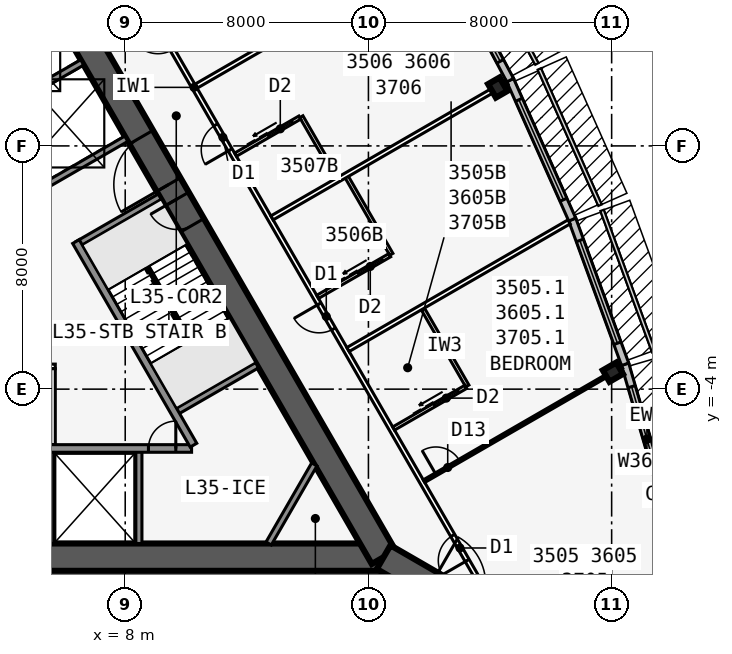
"""IFC4 building model, lengths in metres.
Left out: names, types, materials, properties, quantities, classifications, styles, units other than length and angle.
Written with IfcOpenShell. Run it as: python <this file> out.ifc"""

import sys

from ifc_helpers import new_model, si_unit, direction, frame, frame_2d, origin, origin_2d, place, context, subcontext, project, spatial, rectangle, i_section, extrude, element, fill, save


model = new_model("IFC4")
c1 = context("Model", 3, precision=1e-05, world=origin(), true_north=direction((0.0, 1.0)))
c2 = subcontext(c1, "Body", "Model", "MODEL_VIEW")
j1 = project(units=[si_unit("LENGTHUNIT", "METRE"), si_unit("PLANEANGLEUNIT", "RADIAN")], contexts=[c1])
p1 = place(None, origin())
s1 = spatial("IfcSite", under=j1, at=p1, CompositionType="ELEMENT")
p2 = place(p1, origin())
s2 = spatial("IfcBuilding", under=s1, at=p2, CompositionType="ELEMENT")
p3 = place(p2, frame((0.0, 0.0, 135.1)))
s3 = spatial("IfcBuildingStorey", under=s2, at=p3, CompositionType="ELEMENT", Elevation=135.1)
p4 = place(p3, frame((-16.5, -9.526, 0.0), z_axis=(0.0, 0.0, 1.0), x_axis=(1.0, 0.0, 0.0)))
e1 = element("IfcWall", 1, at=p4, inside=s3, PredefinedType="SHEAR", context=c2, shape_type="SweptSolid", body=[
    extrude(rectangle(XDim=33.0, YDim=0.9, at=frame_2d((16.5, 0.0))), origin(), (0.0, 0.0, 1.0), 3.4),
])
p5 = place(p4, frame((14.05, 0.0, 0.0)))
e2 = element("IfcOpeningElement", 2, at=p5, cuts=e1, PredefinedType="OPENING", context=c2, shape_type="SweptSolid", body=[
    extrude(rectangle(XDim=1.8, YDim=2.13, at=frame_2d((0.9, 1.065))), frame((0.0, 0.46, 0.0), z_axis=(0.0, -1.0, 0.0), x_axis=(1.0, 0.0, 0.0)), (0.0, 0.0, 1.0), 0.92),
])
p6 = place(p3, frame((-0.55, -5.951, 0.0), z_axis=(0.0, 0.0, 1.0), x_axis=(1.0, 0.0, 0.0)))
e3 = element("IfcWall", 3, at=p6, inside=s3, PredefinedType="SOLIDWALL", context=c2, shape_type="SweptSolid", body=[
    extrude(rectangle(XDim=10.733, YDim=0.25, at=frame_2d((5.366, 0.0))), origin(), (0.0, 0.0, 1.0), 3.235),
])
p7 = place(p6, frame((9.314, 0.0, 0.0)))
e4 = element("IfcOpeningElement", 4, at=p7, cuts=e3, PredefinedType="OPENING", context=c2, shape_type="SweptSolid", body=[
    extrude(rectangle(XDim=0.9, YDim=2.13, at=frame_2d((0.45, 1.065))), frame((0.0, 0.135, 0.0), z_axis=(0.0, -1.0, 0.0), x_axis=(1.0, 0.0, 0.0)), (0.0, 0.0, 1.0), 0.27),
])
p8 = place(p6, frame((1.05, 0.0, 0.0)))
e5 = element("IfcOpeningElement", 5, at=p8, cuts=e3, PredefinedType="OPENING", context=c2, shape_type="SweptSolid", body=[
    extrude(rectangle(XDim=1.1, YDim=2.13, at=frame_2d((0.55, 1.065))), frame((0.0, 0.135, 0.0), z_axis=(0.0, -1.0, 0.0), x_axis=(1.0, 0.0, 0.0)), (0.0, 0.0, 1.0), 0.27),
])
p9 = place(p6, frame((4.05, 0.0, 0.0)))
e6 = element("IfcOpeningElement", 6, at=p9, cuts=e3, PredefinedType="OPENING", context=c2, shape_type="SweptSolid", body=[
    extrude(rectangle(XDim=1.1, YDim=2.13, at=frame_2d((0.55, 1.065))), frame((0.0, 0.135, 0.0), z_axis=(0.0, -1.0, 0.0), x_axis=(1.0, 0.0, 0.0)), (0.0, 0.0, 1.0), 0.27),
])
for number, where, z_axis, x_axis in (
    (7, (5.55, -5.951, 0.0), (0.0, 0.0, 1.0), (0.0, -1.0, 0.0)),
    (8, (8.45, -5.951, 0.0), (0.0, 0.0, 1.0), (0.0, -1.0, 0.0)),
):
    element("IfcWall", number, at=place(p3, frame(where, z_axis=z_axis, x_axis=x_axis)), inside=s3, PredefinedType="SOLIDWALL", context=c2, shape_type="SweptSolid", body=[
        extrude(rectangle(XDim=3.125, YDim=0.2, at=frame_2d((1.562, 0.0))), origin(), (0.0, 0.0, 1.0), 3.235),
    ])
p10 = place(p3, frame((16.5, -9.526, 0.0), z_axis=(0.0, 0.0, 1.0), x_axis=(-0.499999749417, 0.866025548458, 0.0)))
e9 = element("IfcWall", 9, at=p10, inside=s3, PredefinedType="SHEAR", context=c2, shape_type="SweptSolid", body=[
    extrude(rectangle(XDim=33.0, YDim=0.9, at=frame_2d((16.5, 0.0))), origin(), (0.0, 0.0, 1.0), 3.4),
])
p11 = place(p10, frame((14.15, 0.0, 0.0)))
e10 = element("IfcOpeningElement", 10, at=p11, cuts=e9, PredefinedType="OPENING", context=c2, shape_type="SweptSolid", body=[
    extrude(rectangle(XDim=1.8, YDim=2.13, at=frame_2d((0.9, 1.065))), frame((0.0, 0.46, 0.0), z_axis=(0.0, -1.0, 0.0), x_axis=(1.0, 0.0, 0.0)), (0.0, 0.0, 1.0), 0.92),
])
p12 = place(p10, frame((12.6, 0.0, 0.0)))
e11 = element("IfcOpeningElement", 11, at=p12, cuts=e9, PredefinedType="OPENING", context=c2, shape_type="SweptSolid", body=[
    extrude(rectangle(XDim=1.0, YDim=2.13, at=frame_2d((0.5, 1.065))), frame((0.0, 0.46, 0.0), z_axis=(0.0, -1.0, 0.0), x_axis=(1.0, 0.0, 0.0)), (0.0, 0.0, 1.0), 0.92),
])
p13 = place(p3, frame((10.245, -5.843, 0.0), z_axis=(0.0, 0.0, 1.0), x_axis=(-0.499993009313, 0.866029439822, 0.0)))
e12 = element("IfcWall", 12, at=p13, inside=s3, PredefinedType="SOLIDWALL", context=c2, shape_type="SweptSolid", body=[
    extrude(rectangle(XDim=7.733, YDim=0.25, at=frame_2d((3.866, 0.0))), origin(), (0.0, 0.0, 1.0), 3.235),
])
for number, where, z_axis, x_axis in (
    (13, (9.629, -4.775, 0.0), (0.0, 0.0, 1.0), (0.866, 0.5, 0.0)),
    (14, (6.429, 0.767, 0.0), (0.0, 0.0, 1.0), (0.866, 0.5, 0.0)),
    (15, (5.329, 2.673, 0.0), (0.0, 0.0, 1.0), (0.866, 0.5, 0.0)),
    (16, (3.879, 5.184, 0.0), (0.0, 0.0, 1.0), (0.866, 0.5, 0.0)),
):
    element("IfcWall", number, at=place(p3, frame(where, z_axis=z_axis, x_axis=x_axis)), inside=s3, PredefinedType="SOLIDWALL", context=c2, shape_type="SweptSolid", body=[
        extrude(rectangle(XDim=3.125, YDim=0.2, at=frame_2d((1.562, 0.0))), origin(), (0.0, 0.0, 1.0), 3.235),
    ])
p14 = place(p3, frame((16.5, -9.526, 0.0), z_axis=(0.0, 0.0, 1.0), x_axis=(0.866031398331, -0.499989616998, 0.0)))
e17 = element("IfcWall", 17, at=p14, inside=s3, PredefinedType="SHEAR", context=c2, shape_type="SweptSolid", body=[
    extrude(rectangle(XDim=4.746, YDim=0.9, at=frame_2d((2.373, 0.0))), origin(), (0.0, 0.0, 1.0), 3.4),
])
p15 = place(p14, frame((1.8, 0.0, 0.0)))
e18 = element("IfcOpeningElement", 18, at=p15, cuts=e17, PredefinedType="OPENING", context=c2, shape_type="SweptSolid", body=[
    extrude(rectangle(XDim=1.8, YDim=2.13, at=frame_2d((0.9, 1.065))), frame((0.0, 0.46, 0.0), z_axis=(0.0, -1.0, 0.0), x_axis=(1.0, 0.0, 0.0)), (0.0, 0.0, 1.0), 0.92),
])
for number, where, z_axis, x_axis in (
    (19, (24.041, -3.44, 0.0), (0.0, 0.0, 1.0), (-0.5, 0.866, 0.0)),
    (20, (20.254, 5.92, 0.0), (0.0, 0.0, 1.0), (0.866, 0.5, 0.0)),
):
    element("IfcColumn", number, at=place(p3, frame(where, z_axis=z_axis, x_axis=x_axis)), inside=s3, PredefinedType="COLUMN", context=c2, shape_type="SweptSolid", body=[
        extrude(i_section(OverallWidth=0.437, OverallDepth=0.513, WebThickness=0.061, FlangeThickness=0.097, at=origin_2d()), origin(), (0.0, 0.0, 1.0), 3.4),
    ])
p16 = place(p3, frame((25.88, -8.118, 0.0), z_axis=(0.0, 0.0, 1.0), x_axis=(-0.279528287117, 0.960137457191, 0.0)))
e21 = element("IfcWall", 21, at=p16, inside=s3, PredefinedType="STANDARD", context=c2, shape_type="SweptSolid", body=[
    extrude(rectangle(XDim=5.148, YDim=0.25, at=frame_2d((2.574, 0.0))), origin(), (0.0, 0.0, 1.0), 3.235),
])
p17 = place(p16, frame((0.774, 0.0, 0.45)))
e22 = element("IfcOpeningElement", 22, at=p17, cuts=e21, PredefinedType="OPENING", context=c2, shape_type="SweptSolid", body=[
    extrude(rectangle(XDim=3.6, YDim=2.4, at=frame_2d((1.8, 1.2))), frame((0.0, 0.135, 0.0), z_axis=(0.0, -1.0, 0.0), x_axis=(1.0, 0.0, 0.0)), (0.0, 0.0, 1.0), 0.27),
])
p18 = place(p3, frame((24.444, -3.183, 0.0), z_axis=(0.0, 0.0, 1.0), x_axis=(-0.343225593282, 0.939252996863, 0.0)))
e23 = element("IfcWall", 23, at=p18, inside=s3, PredefinedType="STANDARD", context=c2, shape_type="SweptSolid", body=[
    extrude(rectangle(XDim=5.076, YDim=0.25, at=frame_2d((2.538, 0.0))), origin(), (0.0, 0.0, 1.0), 3.235),
])
p19 = place(p18, frame((0.738, 0.0, 0.45)))
e24 = element("IfcOpeningElement", 24, at=p19, cuts=e23, PredefinedType="OPENING", context=c2, shape_type="SweptSolid", body=[
    extrude(rectangle(XDim=3.6, YDim=2.4, at=frame_2d((1.8, 1.2))), frame((0.0, 0.135, 0.0), z_axis=(0.0, -1.0, 0.0), x_axis=(1.0, 0.0, 0.0)), (0.0, 0.0, 1.0), 0.27),
])
p20 = place(p3, frame((22.705, 1.576, 0.0), z_axis=(0.0, 0.0, 1.0), x_axis=(-0.406832200364, 0.913502906808, 0.0)))
e25 = element("IfcWall", 25, at=p20, inside=s3, PredefinedType="STANDARD", context=c2, shape_type="SweptSolid", body=[
    extrude(rectangle(XDim=5.028, YDim=0.25, at=frame_2d((2.514, 0.0))), origin(), (0.0, 0.0, 1.0), 3.235),
])
p21 = place(p20, frame((0.714, 0.0, 0.45)))
e26 = element("IfcOpeningElement", 26, at=p21, cuts=e25, PredefinedType="OPENING", context=c2, shape_type="SweptSolid", body=[
    extrude(rectangle(XDim=3.6, YDim=2.4, at=frame_2d((1.8, 1.2))), frame((0.0, 0.135, 0.0), z_axis=(0.0, -1.0, 0.0), x_axis=(1.0, 0.0, 0.0)), (0.0, 0.0, 1.0), 0.27),
])
p22 = place(p3, frame((20.663, 6.161, 0.0), z_axis=(0.0, 0.0, 1.0), x_axis=(-0.469404966864, 0.882982999317, 0.0)))
e27 = element("IfcWall", 27, at=p22, inside=s3, PredefinedType="STANDARD", context=c2, shape_type="SweptSolid", body=[
    extrude(rectangle(XDim=5.003, YDim=0.25, at=frame_2d((2.501, 0.0))), origin(), (0.0, 0.0, 1.0), 3.235),
])
p23 = place(p22, frame((0.701, 0.0, 0.45)))
e28 = element("IfcOpeningElement", 28, at=p23, cuts=e27, PredefinedType="OPENING", context=c2, shape_type="SweptSolid", body=[
    extrude(rectangle(XDim=3.6, YDim=2.4, at=frame_2d((1.8, 1.2))), frame((0.0, 0.135, 0.0), z_axis=(0.0, -1.0, 0.0), x_axis=(1.0, 0.0, 0.0)), (0.0, 0.0, 1.0), 0.27),
])
p24 = place(p3, frame((20.027, -10.985, 0.0), z_axis=(0.0, 0.0, 1.0), x_axis=(-0.500001677587, 0.866024435227, 0.0)))
e29 = element("IfcWall", 29, at=p24, inside=s3, PredefinedType="PARTITIONING", context=c2, shape_type="SweptSolid", body=[
    extrude(rectangle(XDim=39.054, YDim=0.15, at=frame_2d((19.527, 0.0))), origin(), (0.0, 0.0, 1.0), 3.235),
])
p25 = place(p24, frame((1.558, 0.0, 0.0)))
e30 = element("IfcOpeningElement", 30, at=p25, cuts=e29, PredefinedType="OPENING", context=c2, shape_type="SweptSolid", body=[
    extrude(rectangle(XDim=0.95, YDim=2.13, at=frame_2d((0.475, 1.065))), frame((0.0, 0.085, 0.0), z_axis=(0.0, -1.0, 0.0), x_axis=(1.0, 0.0, 0.0)), (0.0, 0.0, 1.0), 0.17),
])
p26 = place(p24, frame((10.352, 0.0, 0.0)))
e31 = element("IfcOpeningElement", 31, at=p26, cuts=e29, PredefinedType="OPENING", context=c2, shape_type="SweptSolid", body=[
    extrude(rectangle(XDim=0.95, YDim=2.13, at=frame_2d((0.475, 1.065))), frame((0.0, 0.085, 0.0), z_axis=(0.0, -1.0, 0.0), x_axis=(1.0, 0.0, 0.0)), (0.0, 0.0, 1.0), 0.17),
])
p27 = place(p24, frame((17.152, 0.0, 0.0)))
e32 = element("IfcOpeningElement", 32, at=p27, cuts=e29, PredefinedType="OPENING", context=c2, shape_type="SweptSolid", body=[
    extrude(rectangle(XDim=0.95, YDim=2.13, at=frame_2d((0.475, 1.065))), frame((0.0, 0.085, 0.0), z_axis=(0.0, -1.0, 0.0), x_axis=(1.0, 0.0, 0.0)), (0.0, 0.0, 1.0), 0.17),
])
p28 = place(p24, frame((20.952, 0.0, 0.0)))
e33 = element("IfcOpeningElement", 33, at=p28, cuts=e29, PredefinedType="OPENING", context=c2, shape_type="SweptSolid", body=[
    extrude(rectangle(XDim=0.95, YDim=2.13, at=frame_2d((0.475, 1.065))), frame((0.0, 0.085, 0.0), z_axis=(0.0, -1.0, 0.0), x_axis=(1.0, 0.0, 0.0)), (0.0, 0.0, 1.0), 0.17),
])
p29 = place(p24, frame((27.152, 0.0, 0.0)))
e34 = element("IfcOpeningElement", 34, at=p29, cuts=e29, PredefinedType="OPENING", context=c2, shape_type="SweptSolid", body=[
    extrude(rectangle(XDim=0.95, YDim=2.13, at=frame_2d((0.475, 1.065))), frame((0.0, 0.085, 0.0), z_axis=(0.0, -1.0, 0.0), x_axis=(1.0, 0.0, 0.0)), (0.0, 0.0, 1.0), 0.17),
])
p30 = place(p24, frame((36.546, 0.0, 0.0)))
e35 = element("IfcOpeningElement", 35, at=p30, cuts=e29, PredefinedType="OPENING", context=c2, shape_type="SweptSolid", body=[
    extrude(rectangle(XDim=0.95, YDim=2.13, at=frame_2d((0.475, 1.065))), frame((0.0, 0.085, 0.0), z_axis=(0.0, -1.0, 0.0), x_axis=(1.0, 0.0, 0.0)), (0.0, 0.0, 1.0), 0.17),
])
p31 = place(p3, frame((17.829, -7.027, 0.0), z_axis=(0.0, 0.0, 1.0), x_axis=(0.866029804378, 0.499992377871, 0.0)))
e36 = element("IfcWall", 36, at=p31, inside=s3, PredefinedType="PARTITIONING", context=c2, shape_type="SweptSolid", body=[
    extrude(rectangle(XDim=7.516, YDim=0.1, at=frame_2d((3.758, 0.0))), origin(), (0.0, 0.0, 1.0), 2.389),
])
p32 = place(p31, frame((0.45, 0.0, 0.0)))
e37 = element("IfcOpeningElement", 37, at=p32, cuts=e36, PredefinedType="OPENING", context=c2, shape_type="SweptSolid", body=[
    extrude(rectangle(XDim=0.9, YDim=2.13, at=frame_2d((0.45, 1.065))), frame((0.0, 0.06, 0.0), z_axis=(0.0, -1.0, 0.0), x_axis=(1.0, 0.0, 0.0)), (0.0, 0.0, 1.0), 0.12),
])
p33 = place(p3, frame((15.329, -2.697, 0.0), z_axis=(0.0, 0.0, 1.0), x_axis=(0.866024316602, 0.50000188305, 0.0)))
e38 = element("IfcWall", 38, at=p33, inside=s3, PredefinedType="PARTITIONING", context=c2, shape_type="SweptSolid", body=[
    extrude(rectangle(XDim=8.395, YDim=0.15, at=frame_2d((4.198, 0.0))), origin(), (0.0, 0.0, 1.0), 2.389),
])
p34 = place(p3, frame((12.829, 1.633, 0.0), z_axis=(0.0, 0.0, 1.0), x_axis=(0.866027015393, 0.499997208602, 0.0)))
e39 = element("IfcWall", 39, at=p34, inside=s3, PredefinedType="PARTITIONING", context=c2, shape_type="SweptSolid", body=[
    extrude(rectangle(XDim=8.922, YDim=0.15, at=frame_2d((4.461, 0.0))), origin(), (0.0, 0.0, 1.0), 2.389),
])
p35 = place(p3, frame((10.329, 5.963, 0.0), z_axis=(0.0, 0.0, 1.0), x_axis=(0.866025170687, 0.500000403736, 0.0)))
e40 = element("IfcWall", 40, at=p35, inside=s3, PredefinedType="PARTITIONING", context=c2, shape_type="SweptSolid", body=[
    extrude(rectangle(XDim=9.099, YDim=0.15, at=frame_2d((4.549, 0.0))), origin(), (0.0, 0.0, 1.0), 2.389),
])
p36 = place(p3, frame((19.253, -3.895, 0.0), z_axis=(0.0, 0.0, 1.0), x_axis=(-0.499990139034, 0.866031096941, 0.0)))
e41 = element("IfcWall", 41, at=p36, inside=s3, PredefinedType="PLUMBINGWALL", context=c2, shape_type="SweptSolid", body=[
    extrude(rectangle(XDim=3.0, YDim=0.12, at=frame_2d((1.5, 0.0))), origin(), (0.0, 0.0, 1.0), 3.235),
])
p37 = place(p3, frame((16.829, -5.295, 0.0), z_axis=(0.0, 0.0, 1.0), x_axis=(0.866035715982, 0.499982138324, 0.0)))
e42 = element("IfcWall", 42, at=p37, inside=s3, PredefinedType="PLUMBINGWALL", context=c2, shape_type="SweptSolid", body=[
    extrude(rectangle(XDim=2.74, YDim=0.12, at=frame_2d((1.37, 0.0))), origin(), (0.0, 0.0, 1.0), 3.235),
])
p38 = place(p37, frame((1.55, 0.0, 0.0)))
e43 = element("IfcOpeningElement", 43, at=p38, cuts=e42, PredefinedType="OPENING", context=c2, shape_type="SweptSolid", body=[
    extrude(rectangle(XDim=0.9, YDim=2.13, at=frame_2d((0.45, 1.065))), frame((0.0, 0.07, 0.0), z_axis=(0.0, -1.0, 0.0), x_axis=(1.0, 0.0, 0.0)), (0.0, 0.0, 1.0), 0.14),
])
p39 = place(p3, frame((16.753, 0.435, 0.0), z_axis=(0.0, 0.0, 1.0), x_axis=(-0.499990139034, 0.866031096941, 0.0)))
e44 = element("IfcWall", 44, at=p39, inside=s3, PredefinedType="PLUMBINGWALL", context=c2, shape_type="SweptSolid", body=[
    extrude(rectangle(XDim=3.0, YDim=0.12, at=frame_2d((1.5, 0.0))), origin(), (0.0, 0.0, 1.0), 3.235),
])
p40 = place(p3, frame((14.329, -0.965, 0.0), z_axis=(0.0, 0.0, 1.0), x_axis=(0.866035715982, 0.499982138324, 0.0)))
e45 = element("IfcWall", 45, at=p40, inside=s3, PredefinedType="PLUMBINGWALL", context=c2, shape_type="SweptSolid", body=[
    extrude(rectangle(XDim=2.74, YDim=0.12, at=frame_2d((1.37, 0.0))), origin(), (0.0, 0.0, 1.0), 3.235),
])
p41 = place(p40, frame((1.55, 0.0, 0.0)))
e46 = element("IfcOpeningElement", 46, at=p41, cuts=e45, PredefinedType="OPENING", context=c2, shape_type="SweptSolid", body=[
    extrude(rectangle(XDim=0.9, YDim=2.13, at=frame_2d((0.45, 1.065))), frame((0.0, 0.07, 0.0), z_axis=(0.0, -1.0, 0.0), x_axis=(1.0, 0.0, 0.0)), (0.0, 0.0, 1.0), 0.14),
])
p42 = place(p3, frame((14.993, 2.883, 0.0), z_axis=(0.0, 0.0, 1.0), x_axis=(-0.500001309137, 0.866024647952, 0.0)))
e47 = element("IfcWall", 47, at=p42, inside=s3, PredefinedType="PLUMBINGWALL", context=c2, shape_type="SweptSolid", body=[
    extrude(rectangle(XDim=2.4, YDim=0.12, at=frame_2d((1.2, 0.0))), origin(), (0.0, 0.0, 1.0), 3.235),
])
p43 = place(p3, frame((11.628, 3.711, 0.0), z_axis=(0.0, 0.0, 1.0), x_axis=(0.866048967903, 0.499959183527, 0.0)))
e48 = element("IfcWall", 48, at=p43, inside=s3, PredefinedType="PLUMBINGWALL", context=c2, shape_type="SweptSolid", body=[
    extrude(rectangle(XDim=2.44, YDim=0.12, at=frame_2d((1.22, 0.0))), origin(), (0.0, 0.0, 1.0), 3.235),
])
p44 = place(p43, frame((1.25, 0.0, 0.0)))
e49 = element("IfcOpeningElement", 49, at=p44, cuts=e48, PredefinedType="OPENING", context=c2, shape_type="SweptSolid", body=[
    extrude(rectangle(XDim=0.9, YDim=2.13, at=frame_2d((0.45, 1.065))), frame((0.0, 0.07, 0.0), z_axis=(0.0, -1.0, 0.0), x_axis=(1.0, 0.0, 0.0)), (0.0, 0.0, 1.0), 0.14),
])
p45 = place(p3, frame((-2.65, -3.251, 0.0), z_axis=(0.0, 0.0, 1.0), x_axis=(1.0, 0.0, 0.0)))
e50 = element("IfcWall", 50, at=p45, inside=s3, PredefinedType="PARTITIONING", context=c2, shape_type="SweptSolid", body=[
    extrude(rectangle(XDim=8.35, YDim=0.15, at=frame_2d((4.175, 0.0))), origin(), (0.0, 0.0, 1.0), 3.235),
])
p46 = place(p3, frame((5.625, -5.826, 0.0), z_axis=(0.0, 0.0, 1.0), x_axis=(0.0, 1.0, 0.0)))
e51 = element("IfcWall", 51, at=p46, inside=s3, PredefinedType="PARTITIONING", context=c2, shape_type="SweptSolid", body=[
    extrude(rectangle(XDim=2.5, YDim=0.15, at=frame_2d((1.25, 0.0))), origin(), (0.0, 0.0, 1.0), 3.235),
])
p47 = place(p3, frame((14.219, -6.476, 0.0), z_axis=(0.0, 0.0, 1.0), x_axis=(-0.499952404951, -0.866052881055, 0.0)))
e52 = element("IfcWall", 52, at=p47, inside=s3, PredefinedType="SOLIDWALL", context=c2, shape_type="SweptSolid", body=[
    extrude(rectangle(XDim=3.002, YDim=0.2, at=frame_2d((1.501, 0.0))), origin(), (0.0, 0.0, 1.0), 3.235),
])
p48 = place(p3, frame((10.135, -2.401, 0.0), z_axis=(0.0, 0.0, 1.0), x_axis=(-0.499992232847, 0.866029888106, 0.0)))
e53 = element("IfcWall", 53, at=p48, inside=s3, PredefinedType="SOLIDWALL", context=c2, shape_type="SweptSolid", body=[
    extrude(rectangle(XDim=2.794, YDim=0.1, at=frame_2d((1.397, 0.0))), origin(), (0.0, 0.0, 1.0), 3.4),
])
p49 = place(p17, origin())
e54 = element("IfcWindow", 54, at=p49, inside=s3, PartitioningType="SINGLE_PANEL", PredefinedType="WINDOW", context=c2, shape_type="SweptSolid", body=[
    extrude(rectangle(XDim=3.6, YDim=2.4, at=frame_2d((1.8, 1.2))), frame((0.0, 0.03, 0.0), z_axis=(0.0, -1.0, 0.0), x_axis=(1.0, 0.0, 0.0)), (0.0, 0.0, 1.0), 0.06),
])
fill(e22, e54)
p50 = place(p19, origin())
e55 = element("IfcWindow", 55, at=p50, inside=s3, PartitioningType="SINGLE_PANEL", PredefinedType="WINDOW", context=c2, shape_type="SweptSolid", body=[
    extrude(rectangle(XDim=3.6, YDim=2.4, at=frame_2d((1.8, 1.2))), frame((0.0, 0.03, 0.0), z_axis=(0.0, -1.0, 0.0), x_axis=(1.0, 0.0, 0.0)), (0.0, 0.0, 1.0), 0.06),
])
fill(e24, e55)
p51 = place(p21, origin())
e56 = element("IfcWindow", 56, at=p51, inside=s3, PartitioningType="SINGLE_PANEL", PredefinedType="WINDOW", context=c2, shape_type="SweptSolid", body=[
    extrude(rectangle(XDim=3.6, YDim=2.4, at=frame_2d((1.8, 1.2))), frame((0.0, 0.03, 0.0), z_axis=(0.0, -1.0, 0.0), x_axis=(1.0, 0.0, 0.0)), (0.0, 0.0, 1.0), 0.06),
])
fill(e26, e56)
p52 = place(p23, origin())
e57 = element("IfcWindow", 57, at=p52, inside=s3, PartitioningType="SINGLE_PANEL", PredefinedType="WINDOW", context=c2, shape_type="SweptSolid", body=[
    extrude(rectangle(XDim=3.6, YDim=2.4, at=frame_2d((1.8, 1.2))), frame((0.0, 0.03, 0.0), z_axis=(0.0, -1.0, 0.0), x_axis=(1.0, 0.0, 0.0)), (0.0, 0.0, 1.0), 0.06),
])
fill(e28, e57)
p53 = place(p32, origin())
e58 = element("IfcDoor", 58, at=p53, inside=s3, OperationType="SINGLE_SWING_LEFT", PredefinedType="DOOR", context=c2, shape_type="SweptSolid", body=[
    extrude(rectangle(XDim=0.9, YDim=2.13, at=frame_2d((0.45, 1.065))), frame((0.0, 0.025, 0.0), z_axis=(0.0, -1.0, 0.0), x_axis=(1.0, 0.0, 0.0)), (0.0, 0.0, 1.0), 0.05),
])
fill(e37, e58)
p54 = place(p25, origin())
e59 = element("IfcDoor", 59, at=p54, inside=s3, OperationType="SINGLE_SWING_LEFT", PredefinedType="DOOR", context=c2, shape_type="SweptSolid", body=[
    extrude(rectangle(XDim=0.95, YDim=2.13, at=frame_2d((0.475, 1.065))), frame((0.0, 0.025, 0.0), z_axis=(0.0, -1.0, 0.0), x_axis=(1.0, 0.0, 0.0)), (0.0, 0.0, 1.0), 0.05),
])
fill(e30, e59)
p55 = place(p38, origin())
e60 = element("IfcDoor", 60, at=p55, inside=s3, OperationType="SLIDING_TO_LEFT", PredefinedType="DOOR", context=c2, shape_type="SweptSolid", body=[
    extrude(rectangle(XDim=0.9, YDim=2.13, at=frame_2d((0.45, 1.065))), frame((0.0, 0.025, 0.0), z_axis=(0.0, -1.0, 0.0), x_axis=(1.0, 0.0, 0.0)), (0.0, 0.0, 1.0), 0.05),
])
fill(e43, e60)
p56 = place(p41, origin())
e61 = element("IfcDoor", 61, at=p56, inside=s3, OperationType="SLIDING_TO_LEFT", PredefinedType="DOOR", context=c2, shape_type="SweptSolid", body=[
    extrude(rectangle(XDim=0.9, YDim=2.13, at=frame_2d((0.45, 1.065))), frame((0.0, 0.025, 0.0), z_axis=(0.0, -1.0, 0.0), x_axis=(1.0, 0.0, 0.0)), (0.0, 0.0, 1.0), 0.05),
])
fill(e46, e61)
p57 = place(p26, origin())
e62 = element("IfcDoor", 62, at=p57, inside=s3, OperationType="SINGLE_SWING_RIGHT", PredefinedType="DOOR", context=c2, shape_type="SweptSolid", body=[
    extrude(rectangle(XDim=0.95, YDim=2.13, at=frame_2d((0.475, 1.065))), frame((0.0, 0.025, 0.0), z_axis=(0.0, -1.0, 0.0), x_axis=(1.0, 0.0, 0.0)), (0.0, 0.0, 1.0), 0.05),
])
fill(e31, e62)
p58 = place(p44, origin())
e63 = element("IfcDoor", 63, at=p58, inside=s3, OperationType="SLIDING_TO_LEFT", PredefinedType="DOOR", context=c2, shape_type="SweptSolid", body=[
    extrude(rectangle(XDim=0.9, YDim=2.13, at=frame_2d((0.45, 1.065))), frame((0.0, 0.025, 0.0), z_axis=(0.0, -1.0, 0.0), x_axis=(1.0, 0.0, 0.0)), (0.0, 0.0, 1.0), 0.05),
])
fill(e49, e63)
p59 = place(p27, origin())
e64 = element("IfcDoor", 64, at=p59, inside=s3, OperationType="SINGLE_SWING_LEFT", PredefinedType="DOOR", context=c2, shape_type="SweptSolid", body=[
    extrude(rectangle(XDim=0.95, YDim=2.13, at=frame_2d((0.475, 1.065))), frame((0.0, 0.025, 0.0), z_axis=(0.0, -1.0, 0.0), x_axis=(1.0, 0.0, 0.0)), (0.0, 0.0, 1.0), 0.05),
])
fill(e32, e64)
p60 = place(p11, origin())
e65 = element("IfcDoor", 65, at=p60, inside=s3, OperationType="DOUBLE_DOOR_SINGLE_SWING", PredefinedType="DOOR", context=c2, shape_type="SweptSolid", body=[
    extrude(rectangle(XDim=1.8, YDim=2.13, at=frame_2d((0.9, 1.065))), frame((0.0, 0.025, 0.0), z_axis=(0.0, -1.0, 0.0), x_axis=(1.0, 0.0, 0.0)), (0.0, 0.0, 1.0), 0.05),
])
fill(e10, e65)
p61 = place(p12, origin())
e66 = element("IfcDoor", 66, at=p61, inside=s3, OperationType="SINGLE_SWING_RIGHT", PredefinedType="DOOR", context=c2, shape_type="SweptSolid", body=[
    extrude(rectangle(XDim=1.0, YDim=2.13, at=frame_2d((0.5, 1.065))), frame((0.0, 0.025, 0.0), z_axis=(0.0, -1.0, 0.0), x_axis=(1.0, 0.0, 0.0)), (0.0, 0.0, 1.0), 0.05),
])
fill(e11, e66)
p62 = place(p7, origin())
e67 = element("IfcDoor", 67, at=p62, inside=s3, OperationType="SINGLE_SWING_RIGHT", PredefinedType="DOOR", context=c2, shape_type="SweptSolid", body=[
    extrude(rectangle(XDim=0.9, YDim=2.13, at=frame_2d((0.45, 1.065))), frame((0.0, 0.025, 0.0), z_axis=(0.0, -1.0, 0.0), x_axis=(1.0, 0.0, 0.0)), (0.0, 0.0, 1.0), 0.05),
])
fill(e4, e67)
save(model, sys.argv[1])
